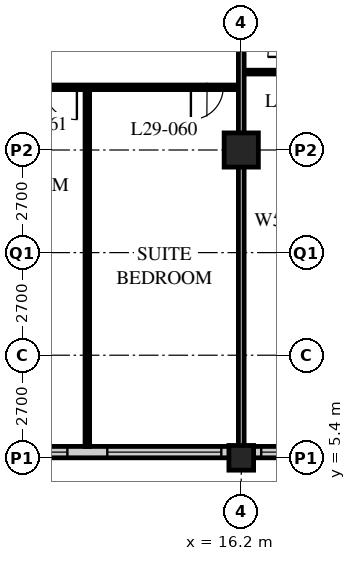
"""IFC4 building model, lengths in metres.
Left out: names, types, materials, properties, quantities, classifications, styles, units other than length and angle.
Written with IfcOpenShell. Run it as: python <this file> out.ifc"""

import sys

from ifc_helpers import new_model, si_unit, direction, frame, frame_2d, origin, origin_2d, place, context, subcontext, project, spatial, rectangle, hollow_rectangle, extrude, element, fill, save


model = new_model("IFC4")
c1 = context("Model", 3, precision=1e-05, world=origin(), true_north=direction((0.0, 1.0)))
c2 = subcontext(c1, "Body", "Model", "MODEL_VIEW")
j1 = project(units=[si_unit("LENGTHUNIT", "METRE"), si_unit("PLANEANGLEUNIT", "RADIAN")], contexts=[c1])
p1 = place(None, origin())
s1 = spatial("IfcSite", under=j1, at=p1, CompositionType="ELEMENT")
p2 = place(p1, origin())
s2 = spatial("IfcBuilding", under=s1, at=p2, CompositionType="ELEMENT")
p3 = place(p2, frame((0.0, 0.0, 117.0)))
s3 = spatial("IfcBuildingStorey", under=s2, at=p3, CompositionType="ELEMENT", Elevation=117.0)
p4 = place(p3, frame((16.2, 5.4, 0.0), z_axis=(0.0, 0.0, 1.0), x_axis=(1.0, 0.0, 0.0)))
e1 = element("IfcColumn", 1, at=p4, inside=s3, PredefinedType="COLUMN", context=c2, shape_type="SweptSolid", body=[
    extrude(hollow_rectangle(XDim=0.65, YDim=0.65, WallThickness=0.055, at=origin_2d()), origin(), (0.0, 0.0, 1.0), 3.4),
])
p5 = place(p3, frame((16.2, 13.5, 0.0), z_axis=(0.0, 0.0, 1.0), x_axis=(1.0, 0.0, 0.0)))
e2 = element("IfcColumn", 2, at=p5, inside=s3, PredefinedType="COLUMN", context=c2, shape_type="SweptSolid", body=[
    extrude(hollow_rectangle(XDim=0.9, YDim=0.9, WallThickness=0.09, at=origin_2d()), origin(), (0.0, 0.0, 1.0), 3.4),
])
p6 = place(p3, frame((8.4, 5.55, 0.0), z_axis=(0.0, 0.0, 1.0), x_axis=(1.0, 0.0, 0.0)))
e3 = element("IfcWall", 3, at=p6, inside=s3, PredefinedType="SOLIDWALL", context=c2, shape_type="SweptSolid", body=[
    extrude(rectangle(XDim=40.2, YDim=0.3, at=frame_2d((20.1, 0.0))), origin(), (0.0, 0.0, 1.0), 3.19),
])
p7 = place(p6, frame((0.225, 0.0, 0.9)))
e4 = element("IfcOpeningElement", 4, at=p7, cuts=e3, PredefinedType="OPENING", context=c2, shape_type="SweptSolid", body=[
    extrude(rectangle(XDim=3.0, YDim=2.0, at=frame_2d((1.5, 1.0))), frame((0.0, 0.16, 0.0), z_axis=(0.0, -1.0, 0.0), x_axis=(1.0, 0.0, 0.0)), (0.0, 0.0, 1.0), 0.32),
])
p8 = place(p6, frame((4.275, 0.0, 0.9)))
e5 = element("IfcOpeningElement", 5, at=p8, cuts=e3, PredefinedType="OPENING", context=c2, shape_type="SweptSolid", body=[
    extrude(rectangle(XDim=3.0, YDim=2.0, at=frame_2d((1.5, 1.0))), frame((0.0, 0.16, 0.0), z_axis=(0.0, -1.0, 0.0), x_axis=(1.0, 0.0, 0.0)), (0.0, 0.0, 1.0), 0.32),
])
p9 = place(p6, frame((8.325, 0.0, 0.9)))
e6 = element("IfcOpeningElement", 6, at=p9, cuts=e3, PredefinedType="OPENING", context=c2, shape_type="SweptSolid", body=[
    extrude(rectangle(XDim=3.0, YDim=2.0, at=frame_2d((1.5, 1.0))), frame((0.0, 0.16, 0.0), z_axis=(0.0, -1.0, 0.0), x_axis=(1.0, 0.0, 0.0)), (0.0, 0.0, 1.0), 0.32),
])
p10 = place(p6, frame((12.375, 0.0, 0.9)))
e7 = element("IfcOpeningElement", 7, at=p10, cuts=e3, PredefinedType="OPENING", context=c2, shape_type="SweptSolid", body=[
    extrude(rectangle(XDim=3.0, YDim=2.0, at=frame_2d((1.5, 1.0))), frame((0.0, 0.16, 0.0), z_axis=(0.0, -1.0, 0.0), x_axis=(1.0, 0.0, 0.0)), (0.0, 0.0, 1.0), 0.32),
])
p11 = place(p6, frame((16.425, 0.0, 0.9)))
e8 = element("IfcOpeningElement", 8, at=p11, cuts=e3, PredefinedType="OPENING", context=c2, shape_type="SweptSolid", body=[
    extrude(rectangle(XDim=3.0, YDim=2.0, at=frame_2d((1.5, 1.0))), frame((0.0, 0.16, 0.0), z_axis=(0.0, -1.0, 0.0), x_axis=(1.0, 0.0, 0.0)), (0.0, 0.0, 1.0), 0.32),
])
p12 = place(p6, frame((20.475, 0.0, 0.9)))
e9 = element("IfcOpeningElement", 9, at=p12, cuts=e3, PredefinedType="OPENING", context=c2, shape_type="SweptSolid", body=[
    extrude(rectangle(XDim=3.0, YDim=2.0, at=frame_2d((1.5, 1.0))), frame((0.0, 0.16, 0.0), z_axis=(0.0, -1.0, 0.0), x_axis=(1.0, 0.0, 0.0)), (0.0, 0.0, 1.0), 0.32),
])
p13 = place(p6, frame((24.525, 0.0, 0.9)))
e10 = element("IfcOpeningElement", 10, at=p13, cuts=e3, PredefinedType="OPENING", context=c2, shape_type="SweptSolid", body=[
    extrude(rectangle(XDim=3.0, YDim=2.0, at=frame_2d((1.5, 1.0))), frame((0.0, 0.16, 0.0), z_axis=(0.0, -1.0, 0.0), x_axis=(1.0, 0.0, 0.0)), (0.0, 0.0, 1.0), 0.32),
])
p14 = place(p6, frame((28.575, 0.0, 0.9)))
e11 = element("IfcOpeningElement", 11, at=p14, cuts=e3, PredefinedType="OPENING", context=c2, shape_type="SweptSolid", body=[
    extrude(rectangle(XDim=3.0, YDim=2.0, at=frame_2d((1.5, 1.0))), frame((0.0, 0.16, 0.0), z_axis=(0.0, -1.0, 0.0), x_axis=(1.0, 0.0, 0.0)), (0.0, 0.0, 1.0), 0.32),
])
p15 = place(p6, frame((32.625, 0.0, 0.9)))
e12 = element("IfcOpeningElement", 12, at=p15, cuts=e3, PredefinedType="OPENING", context=c2, shape_type="SweptSolid", body=[
    extrude(rectangle(XDim=3.0, YDim=2.0, at=frame_2d((1.5, 1.0))), frame((0.0, 0.16, 0.0), z_axis=(0.0, -1.0, 0.0), x_axis=(1.0, 0.0, 0.0)), (0.0, 0.0, 1.0), 0.32),
])
p16 = place(p6, frame((36.675, 0.0, 0.9)))
e13 = element("IfcOpeningElement", 13, at=p16, cuts=e3, PredefinedType="OPENING", context=c2, shape_type="SweptSolid", body=[
    extrude(rectangle(XDim=3.0, YDim=2.0, at=frame_2d((1.5, 1.0))), frame((0.0, 0.16, 0.0), z_axis=(0.0, -1.0, 0.0), x_axis=(1.0, 0.0, 0.0)), (0.0, 0.0, 1.0), 0.32),
])
p17 = place(p3, frame((16.2, 15.55, 0.0), z_axis=(0.0, 0.0, 1.0), x_axis=(1.0, 0.0, 0.0)))
e14 = element("IfcWall", 14, at=p17, inside=s3, PredefinedType="PARTITIONING", context=c2, shape_type="SweptSolid", body=[
    extrude(rectangle(XDim=1.5, YDim=0.1, at=frame_2d((0.75, 0.0))), origin(), (0.0, 0.0, 1.0), 3.19),
])
p18 = place(p3, frame((8.15, 15.15, 0.0), z_axis=(0.0, 0.0, 1.0), x_axis=(1.0, 0.0, 0.0)))
e15 = element("IfcWall", 15, at=p18, inside=s3, PredefinedType="PARTITIONING", context=c2, shape_type="SweptSolid", body=[
    extrude(rectangle(XDim=8.05, YDim=0.12, at=frame_2d((4.025, 0.0))), origin(), (0.0, 0.0, 1.0), 3.19),
])
p19 = place(p18, frame((6.725, 0.0, 0.0)))
e16 = element("IfcOpeningElement", 16, at=p19, cuts=e15, PredefinedType="OPENING", context=c2, shape_type="SweptSolid", body=[
    extrude(rectangle(XDim=0.85, YDim=2.1, at=frame_2d((0.425, 1.05))), frame((0.0, 0.07, 0.0), z_axis=(0.0, -1.0, 0.0), x_axis=(1.0, 0.0, 0.0)), (0.0, 0.0, 1.0), 0.14),
])
p20 = place(p18, frame((2.875, 0.0, 0.0)))
e17 = element("IfcOpeningElement", 17, at=p20, cuts=e15, PredefinedType="OPENING", context=c2, shape_type="SweptSolid", body=[
    extrude(rectangle(XDim=0.85, YDim=2.1, at=frame_2d((0.425, 1.05))), frame((0.0, 0.07, 0.0), z_axis=(0.0, -1.0, 0.0), x_axis=(1.0, 0.0, 0.0)), (0.0, 0.0, 1.0), 0.14),
])
p21 = place(p3, frame((12.15, 15.15, 0.0), z_axis=(0.0, 0.0, 1.0), x_axis=(0.0, -1.0, 0.0)))
e18 = element("IfcWall", 18, at=p21, inside=s3, PredefinedType="PARTITIONING", context=c2, shape_type="SweptSolid", body=[
    extrude(rectangle(XDim=9.45, YDim=0.12, at=frame_2d((4.725, 0.0))), origin(), (0.0, 0.0, 1.0), 3.19),
])
p22 = place(p3, frame((16.2, 17.55, 0.0), z_axis=(0.0, 0.0, 1.0), x_axis=(0.0, -1.0, 0.0)))
e19 = element("IfcWall", 19, at=p22, inside=s3, PredefinedType="PARTITIONING", context=c2, shape_type="SweptSolid", body=[
    extrude(rectangle(XDim=11.85, YDim=0.15, at=frame_2d((5.925, 0.0))), origin(), (0.0, 0.0, 1.0), 2.578),
])
p23 = place(p7, origin())
e20 = element("IfcWindow", 20, at=p23, inside=s3, PartitioningType="SINGLE_PANEL", PredefinedType="WINDOW", context=c2, shape_type="SweptSolid", body=[
    extrude(rectangle(XDim=3.0, YDim=2.0, at=frame_2d((1.5, 1.0))), frame((0.0, 0.03, 0.0), z_axis=(0.0, -1.0, 0.0), x_axis=(1.0, 0.0, 0.0)), (0.0, 0.0, 1.0), 0.06),
])
fill(e4, e20)
p24 = place(p8, origin())
e21 = element("IfcWindow", 21, at=p24, inside=s3, PartitioningType="SINGLE_PANEL", PredefinedType="WINDOW", context=c2, shape_type="SweptSolid", body=[
    extrude(rectangle(XDim=3.0, YDim=2.0, at=frame_2d((1.5, 1.0))), frame((0.0, 0.03, 0.0), z_axis=(0.0, -1.0, 0.0), x_axis=(1.0, 0.0, 0.0)), (0.0, 0.0, 1.0), 0.06),
])
fill(e5, e21)
p25 = place(p9, origin())
e22 = element("IfcWindow", 22, at=p25, inside=s3, PartitioningType="SINGLE_PANEL", PredefinedType="WINDOW", context=c2, shape_type="SweptSolid", body=[
    extrude(rectangle(XDim=3.0, YDim=2.0, at=frame_2d((1.5, 1.0))), frame((0.0, 0.03, 0.0), z_axis=(0.0, -1.0, 0.0), x_axis=(1.0, 0.0, 0.0)), (0.0, 0.0, 1.0), 0.06),
])
fill(e6, e22)
p26 = place(p19, origin())
e23 = element("IfcDoor", 23, at=p26, inside=s3, OperationType="SINGLE_SWING_RIGHT", PredefinedType="DOOR", context=c2, shape_type="SweptSolid", body=[
    extrude(rectangle(XDim=0.85, YDim=2.1, at=frame_2d((0.425, 1.05))), frame((0.0, 0.025, 0.0), z_axis=(0.0, -1.0, 0.0), x_axis=(1.0, 0.0, 0.0)), (0.0, 0.0, 1.0), 0.05),
])
fill(e16, e23)
p27 = place(p20, origin())
e24 = element("IfcDoor", 24, at=p27, inside=s3, OperationType="SINGLE_SWING_LEFT", PredefinedType="DOOR", context=c2, shape_type="SweptSolid", body=[
    extrude(rectangle(XDim=0.85, YDim=2.1, at=frame_2d((0.425, 1.05))), frame((0.0, 0.025, 0.0), z_axis=(0.0, -1.0, 0.0), x_axis=(1.0, 0.0, 0.0)), (0.0, 0.0, 1.0), 0.05),
])
fill(e17, e24)
save(model, sys.argv[1])
